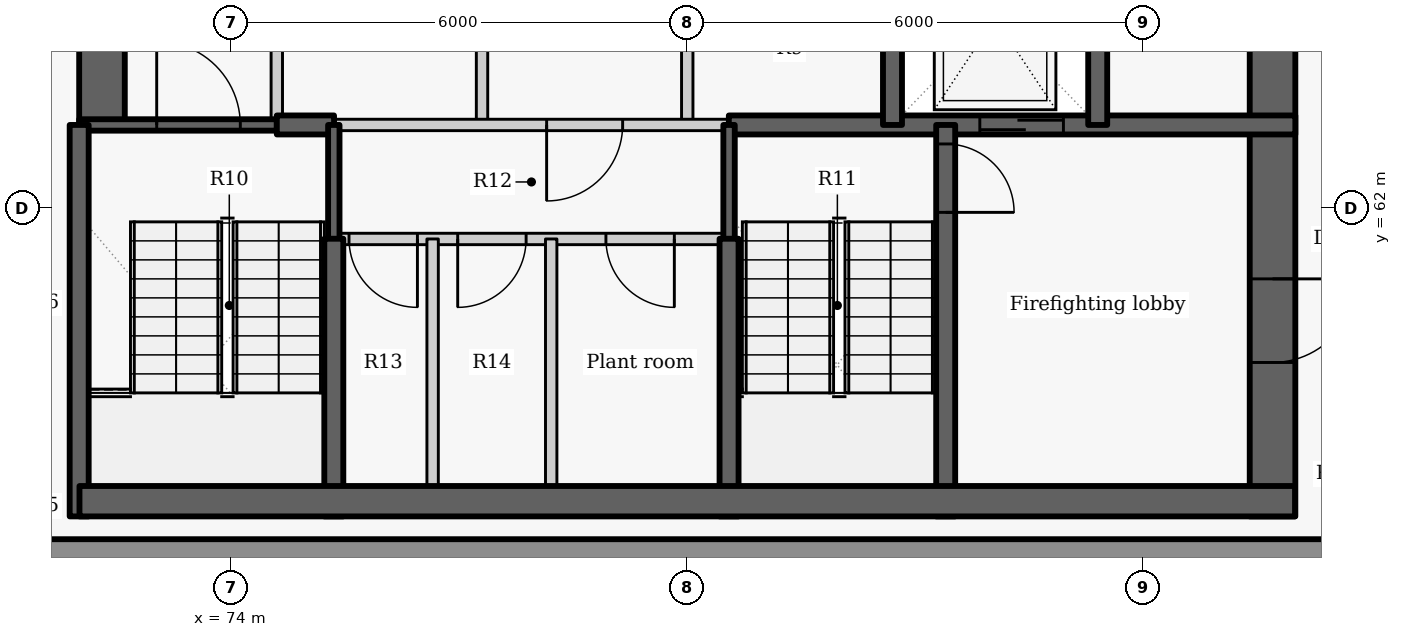
"""IFC4 building model, lengths in metres.
Left out: names, types, materials, properties, quantities, classifications, styles, units other than length and angle.
Written with IfcOpenShell. Run it as: python <this file> out.ifc"""

import sys

from ifc_helpers import new_model, si_unit, direction, frame, frame_2d, origin, place, context, subcontext, project, spatial, rectangle, extrude, element, fill, save


model = new_model("IFC4")
c1 = context("Model", 3, precision=1e-05, world=origin(), true_north=direction((0.0, 1.0)))
c2 = subcontext(c1, "Body", "Model", "MODEL_VIEW")
j1 = project(units=[si_unit("LENGTHUNIT", "METRE"), si_unit("PLANEANGLEUNIT", "RADIAN")], contexts=[c1])
p1 = place(None, origin())
s1 = spatial("IfcSite", under=j1, at=p1, CompositionType="ELEMENT")
p2 = place(p1, origin())
s2 = spatial("IfcBuilding", under=s1, at=p2, CompositionType="ELEMENT")
p3 = place(p2, frame((0.0, 0.0, 276.0)))
s3 = spatial("IfcBuildingStorey", under=s2, at=p3, CompositionType="ELEMENT", Elevation=276.0)
p4 = place(p3, frame((70.451, 57.5, 0.0), z_axis=(0.0, 0.0, 1.0), x_axis=(1.0, 0.0, 0.0)))
e1 = element("IfcWall", 1, at=p4, inside=s3, PredefinedType="SOLIDWALL", context=c2, shape_type="SweptSolid", body=[
    extrude(rectangle(XDim=19.093, YDim=0.3, at=frame_2d((9.546, 0.0))), origin(), (0.0, 0.0, 1.0), 2.725),
])
p5 = place(p3, frame((74.6, 63.1, 0.0), z_axis=(0.0, 0.0, 1.0), x_axis=(0.0, 1.0, 0.0)))
e2 = element("IfcWall", 2, at=p5, inside=s3, PredefinedType="PARTITIONING", context=c2, shape_type="SweptSolid", body=[
    extrude(rectangle(XDim=2.8, YDim=0.15, at=frame_2d((1.4, 0.0))), origin(), (0.0, 0.0, 1.0), 3.325),
])
p6 = place(p3, frame((72.3, 63.1, -0.275), z_axis=(0.0, 0.0, 1.0), x_axis=(0.0, 1.0, 0.0)))
e3 = element("IfcWall", 3, at=p6, inside=s3, PredefinedType="SHEAR", context=c2, shape_type="SweptSolid", body=[
    extrude(rectangle(XDim=9.1, YDim=0.6, at=frame_2d((4.55, 0.0))), origin(), (0.0, 0.0, 1.0), 3.6),
])
p7 = place(p6, frame((3.75, 0.0, 0.275)))
e4 = element("IfcOpeningElement", 4, at=p7, cuts=e3, PredefinedType="OPENING", context=c2, shape_type="SweptSolid", body=[
    extrude(rectangle(XDim=1.5, YDim=2.1, at=frame_2d((0.75, 1.05))), frame((0.0, 0.31, 0.0), z_axis=(0.0, -1.0, 0.0), x_axis=(1.0, 0.0, 0.0)), (0.0, 0.0, 1.0), 0.62),
])
for number, where, z_axis, x_axis in (
    (5, (77.3, 63.1, 0.0), (0.0, 0.0, 1.0), (0.0, 1.0, 0.0)),
    (6, (80.0, 63.1, 0.0), (0.0, 0.0, 1.0), (0.0, 1.0, 0.0)),
):
    element("IfcWall", number, at=place(p3, frame(where, z_axis=z_axis, x_axis=x_axis)), inside=s3, PredefinedType="PARTITIONING", context=c2, shape_type="SweptSolid", body=[
        extrude(rectangle(XDim=2.8, YDim=0.15, at=frame_2d((1.4, 0.0))), origin(), (0.0, 0.0, 1.0), 3.325),
    ])
p8 = place(p3, frame((87.7, 69.3, -0.275), z_axis=(0.0, 0.0, 1.0), x_axis=(0.0, -1.0, 0.0)))
e7 = element("IfcWall", 7, at=p8, inside=s3, PredefinedType="SHEAR", context=c2, shape_type="SweptSolid", body=[
    extrude(rectangle(XDim=11.35, YDim=0.6, at=frame_2d((5.675, 0.0))), origin(), (0.0, 0.0, 1.0), 3.6),
])
p9 = place(p8, frame((0.95, 0.0, 0.275)))
e8 = element("IfcOpeningElement", 8, at=p9, cuts=e7, PredefinedType="OPENING", context=c2, shape_type="SweptSolid", body=[
    extrude(rectangle(XDim=1.5, YDim=2.1, at=frame_2d((0.75, 1.05))), frame((0.0, 0.31, 0.0), z_axis=(0.0, -1.0, 0.0), x_axis=(1.0, 0.0, 0.0)), (0.0, 0.0, 1.0), 0.62),
])
p10 = place(p8, frame((8.225, 0.0, 0.275)))
e9 = element("IfcOpeningElement", 9, at=p10, cuts=e7, PredefinedType="OPENING", context=c2, shape_type="SweptSolid", body=[
    extrude(rectangle(XDim=1.1, YDim=2.1, at=frame_2d((0.55, 1.05))), frame((0.0, 0.31, 0.0), z_axis=(0.0, -1.0, 0.0), x_axis=(1.0, 0.0, 0.0)), (0.0, 0.0, 1.0), 0.62),
])
p11 = place(p3, frame((72.0, 63.1, -0.275), z_axis=(0.0, 0.0, 1.0), x_axis=(1.0, 0.0, 0.0)))
e10 = element("IfcWall", 10, at=p11, inside=s3, PredefinedType="SHEAR", context=c2, shape_type="SweptSolid", body=[
    extrude(rectangle(XDim=2.6, YDim=0.15, at=frame_2d((1.3, 0.0))), origin(), (0.0, 0.0, 1.0), 3.6),
])
p12 = place(p11, frame((1.02, 0.0, 0.275)))
e11 = element("IfcOpeningElement", 11, at=p12, cuts=e10, PredefinedType="OPENING", context=c2, shape_type="SweptSolid", body=[
    extrude(rectangle(XDim=1.1, YDim=2.1, at=frame_2d((0.55, 1.05))), frame((0.0, 0.085, 0.0), z_axis=(0.0, -1.0, 0.0), x_axis=(1.0, 0.0, 0.0)), (0.0, 0.0, 1.0), 0.17),
])
p13 = place(p3, frame((74.6, 63.1, -0.275), z_axis=(0.0, 0.0, 1.0), x_axis=(1.0, 0.0, 0.0)))
e12 = element("IfcWall", 12, at=p13, inside=s3, PredefinedType="SHEAR", context=c2, shape_type="SweptSolid", body=[
    extrude(rectangle(XDim=0.753, YDim=0.25, at=frame_2d((0.376, 0.0))), origin(), (0.0, 0.0, 1.0), 3.6),
])
p14 = place(p3, frame((80.547, 63.1, -0.275), z_axis=(0.0, 0.0, 1.0), x_axis=(1.0, 0.0, 0.0)))
e13 = element("IfcWall", 13, at=p14, inside=s3, PredefinedType="SHEAR", context=c2, shape_type="SweptSolid", body=[
    extrude(rectangle(XDim=7.453, YDim=0.25, at=frame_2d((3.727, 0.0))), origin(), (0.0, 0.0, 1.0), 3.6),
])
p15 = place(p14, frame((3.302, 0.0, 0.275)))
e14 = element("IfcOpeningElement", 14, at=p15, cuts=e13, PredefinedType="OPENING", context=c2, shape_type="SweptSolid", body=[
    extrude(rectangle(XDim=1.1, YDim=2.1, at=frame_2d((0.55, 1.05))), frame((0.0, 0.135, 0.0), z_axis=(0.0, -1.0, 0.0), x_axis=(1.0, 0.0, 0.0)), (0.0, 0.0, 1.0), 0.27),
])
p16 = place(p3, frame((80.553, 63.1, 0.0), z_axis=(0.0, 0.0, 1.0), x_axis=(-1.0, 0.0, 0.0)))
e15 = element("IfcWall", 15, at=p16, inside=s3, PredefinedType="PARTITIONING", context=c2, shape_type="SweptSolid", body=[
    extrude(rectangle(XDim=5.206, YDim=0.15, at=frame_2d((2.603, 0.0))), origin(), (0.0, 0.0, 1.0), 3.325),
])
p17 = place(p16, frame((1.403, 0.0, 0.0)))
e16 = element("IfcOpeningElement", 16, at=p17, cuts=e15, PredefinedType="OPENING", context=c2, shape_type="SweptSolid", body=[
    extrude(rectangle(XDim=1.0, YDim=2.1, at=frame_2d((0.5, 1.05))), frame((0.0, 0.085, 0.0), z_axis=(0.0, -1.0, 0.0), x_axis=(1.0, 0.0, 0.0)), (0.0, 0.0, 1.0), 0.17),
])
for number, where, z_axis, x_axis in (
    (17, (82.7, 63.1, -0.275), (0.0, 0.0, 1.0), (0.0, 1.0, 0.0)),
    (18, (85.4, 63.1, -0.275), (0.0, 0.0, 1.0), (0.0, 1.0, 0.0)),
):
    element("IfcWall", number, at=place(p3, frame(where, z_axis=z_axis, x_axis=x_axis)), inside=s3, PredefinedType="SHEAR", context=c2, shape_type="SweptSolid", body=[
        extrude(rectangle(XDim=2.8, YDim=0.25, at=frame_2d((1.4, 0.0))), origin(), (0.0, 0.0, 1.0), 3.6),
    ])
p18 = place(p3, frame((75.35, 61.597, -0.275), z_axis=(0.0, 0.0, 1.0), x_axis=(0.0, 1.0, 0.0)))
e19 = element("IfcWall", 19, at=p18, inside=s3, PredefinedType="SHEAR", context=c2, shape_type="SweptSolid", body=[
    extrude(rectangle(XDim=1.503, YDim=0.15, at=frame_2d((0.751, 0.0))), origin(), (0.0, 0.0, 1.0), 3.6),
])
p19 = place(p3, frame((75.35, 57.95, -0.275), z_axis=(0.0, 0.0, 1.0), x_axis=(0.0, 1.0, 0.0)))
e20 = element("IfcWall", 20, at=p19, inside=s3, PredefinedType="SHEAR", context=c2, shape_type="SweptSolid", body=[
    extrude(rectangle(XDim=3.653, YDim=0.25, at=frame_2d((1.827, 0.0))), origin(), (0.0, 0.0, 1.0), 3.6),
])
p20 = place(p3, frame((72.0, 57.95, -0.275), z_axis=(0.0, 0.0, 1.0), x_axis=(0.0, 1.0, 0.0)))
e21 = element("IfcWall", 21, at=p20, inside=s3, PredefinedType="SHEAR", context=c2, shape_type="SweptSolid", body=[
    extrude(rectangle(XDim=5.15, YDim=0.25, at=frame_2d((2.575, 0.0))), origin(), (0.0, 0.0, 1.0), 3.6),
])
p21 = place(p3, frame((83.4, 63.1, -0.275), z_axis=(0.0, 0.0, 1.0), x_axis=(0.0, -1.0, 0.0)))
e22 = element("IfcWall", 22, at=p21, inside=s3, PredefinedType="SHEAR", context=c2, shape_type="SweptSolid", body=[
    extrude(rectangle(XDim=5.15, YDim=0.25, at=frame_2d((2.575, 0.0))), origin(), (0.0, 0.0, 1.0), 3.6),
])
p22 = place(p21, frame((0.25, 0.0, 0.275)))
e23 = element("IfcOpeningElement", 23, at=p22, cuts=e22, PredefinedType="OPENING", context=c2, shape_type="SweptSolid", body=[
    extrude(rectangle(XDim=0.9, YDim=2.1, at=frame_2d((0.45, 1.05))), frame((0.0, 0.135, 0.0), z_axis=(0.0, -1.0, 0.0), x_axis=(1.0, 0.0, 0.0)), (0.0, 0.0, 1.0), 0.27),
])
p23 = place(p3, frame((80.55, 61.597, -0.275), z_axis=(0.0, 0.0, 1.0), x_axis=(0.0, 1.0, 0.0)))
e24 = element("IfcWall", 24, at=p23, inside=s3, PredefinedType="SHEAR", context=c2, shape_type="SweptSolid", body=[
    extrude(rectangle(XDim=1.503, YDim=0.15, at=frame_2d((0.751, 0.0))), origin(), (0.0, 0.0, 1.0), 3.6),
])
p24 = place(p3, frame((80.55, 57.95, -0.275), z_axis=(0.0, 0.0, 1.0), x_axis=(0.0, 1.0, 0.0)))
e25 = element("IfcWall", 25, at=p24, inside=s3, PredefinedType="SHEAR", context=c2, shape_type="SweptSolid", body=[
    extrude(rectangle(XDim=3.653, YDim=0.25, at=frame_2d((1.827, 0.0))), origin(), (0.0, 0.0, 1.0), 3.6),
])
p25 = place(p3, frame((80.55, 61.6, 0.0), z_axis=(0.0, 0.0, 1.0), x_axis=(-1.0, 0.0, 0.0)))
e26 = element("IfcWall", 26, at=p25, inside=s3, PredefinedType="PARTITIONING", context=c2, shape_type="SweptSolid", body=[
    extrude(rectangle(XDim=5.2, YDim=0.15, at=frame_2d((2.6, 0.0))), origin(), (0.0, 0.0, 1.0), 3.325),
])
p26 = place(p25, frame((4.1, 0.0, 0.0)))
e27 = element("IfcOpeningElement", 27, at=p26, cuts=e26, PredefinedType="OPENING", context=c2, shape_type="SweptSolid", body=[
    extrude(rectangle(XDim=0.9, YDim=2.1, at=frame_2d((0.45, 1.05))), frame((0.0, 0.085, 0.0), z_axis=(0.0, -1.0, 0.0), x_axis=(1.0, 0.0, 0.0)), (0.0, 0.0, 1.0), 0.17),
])
p27 = place(p25, frame((2.67, 0.0, 0.0)))
e28 = element("IfcOpeningElement", 28, at=p27, cuts=e26, PredefinedType="OPENING", context=c2, shape_type="SweptSolid", body=[
    extrude(rectangle(XDim=0.9, YDim=2.1, at=frame_2d((0.45, 1.05))), frame((0.0, 0.085, 0.0), z_axis=(0.0, -1.0, 0.0), x_axis=(1.0, 0.0, 0.0)), (0.0, 0.0, 1.0), 0.17),
])
p28 = place(p25, frame((0.72, 0.0, 0.0)))
e29 = element("IfcOpeningElement", 29, at=p28, cuts=e26, PredefinedType="OPENING", context=c2, shape_type="SweptSolid", body=[
    extrude(rectangle(XDim=0.9, YDim=2.1, at=frame_2d((0.45, 1.05))), frame((0.0, 0.085, 0.0), z_axis=(0.0, -1.0, 0.0), x_axis=(1.0, 0.0, 0.0)), (0.0, 0.0, 1.0), 0.17),
])
for number, where, z_axis, x_axis in (
    (30, (76.65, 57.95, 0.0), (0.0, 0.0, 1.0), (0.0, 1.0, 0.0)),
    (31, (78.21, 57.95, 0.0), (0.0, 0.0, 1.0), (0.0, 1.0, 0.0)),
):
    element("IfcWall", number, at=place(p3, frame(where, z_axis=z_axis, x_axis=x_axis)), inside=s3, PredefinedType="PARTITIONING", context=c2, shape_type="SweptSolid", body=[
        extrude(rectangle(XDim=3.65, YDim=0.15, at=frame_2d((1.825, 0.0))), origin(), (0.0, 0.0, 1.0), 3.325),
    ])
p29 = place(p3, frame((72.004, 58.15, -0.275), z_axis=(0.0, 0.0, 1.0), x_axis=(1.0, 0.0, 0.0)))
e32 = element("IfcWall", 32, at=p29, inside=s3, PredefinedType="SHEAR", context=c2, shape_type="SweptSolid", body=[
    extrude(rectangle(XDim=15.992, YDim=0.4, at=frame_2d((7.996, 0.0))), origin(), (0.0, 0.0, 1.0), 3.6),
])
p30 = place(p15, origin())
e33 = element("IfcDoor", 33, at=p30, inside=s3, OperationType="SLIDING_TO_LEFT", PredefinedType="DOOR", context=c2, shape_type="SweptSolid", body=[
    extrude(rectangle(XDim=1.1, YDim=2.1, at=frame_2d((0.55, 1.05))), frame((0.0, 0.025, 0.0), z_axis=(0.0, -1.0, 0.0), x_axis=(1.0, 0.0, 0.0)), (0.0, 0.0, 1.0), 0.05),
])
fill(e14, e33)
p31 = place(p17, origin())
e34 = element("IfcDoor", 34, at=p31, inside=s3, OperationType="SINGLE_SWING_RIGHT", PredefinedType="DOOR", context=c2, shape_type="SweptSolid", body=[
    extrude(rectangle(XDim=1.0, YDim=2.1, at=frame_2d((0.5, 1.05))), frame((0.0, 0.025, 0.0), z_axis=(0.0, -1.0, 0.0), x_axis=(1.0, 0.0, 0.0)), (0.0, 0.0, 1.0), 0.05),
])
fill(e16, e34)
p32 = place(p26, origin())
e35 = element("IfcDoor", 35, at=p32, inside=s3, OperationType="SINGLE_SWING_LEFT", PredefinedType="DOOR", context=c2, shape_type="SweptSolid", body=[
    extrude(rectangle(XDim=0.9, YDim=2.1, at=frame_2d((0.45, 1.05))), frame((0.0, 0.025, 0.0), z_axis=(0.0, -1.0, 0.0), x_axis=(1.0, 0.0, 0.0)), (0.0, 0.0, 1.0), 0.05),
])
fill(e27, e35)
p33 = place(p27, origin())
e36 = element("IfcDoor", 36, at=p33, inside=s3, OperationType="SINGLE_SWING_RIGHT", PredefinedType="DOOR", context=c2, shape_type="SweptSolid", body=[
    extrude(rectangle(XDim=0.9, YDim=2.1, at=frame_2d((0.45, 1.05))), frame((0.0, 0.025, 0.0), z_axis=(0.0, -1.0, 0.0), x_axis=(1.0, 0.0, 0.0)), (0.0, 0.0, 1.0), 0.05),
])
fill(e28, e36)
p34 = place(p28, origin())
e37 = element("IfcDoor", 37, at=p34, inside=s3, OperationType="SINGLE_SWING_LEFT", PredefinedType="DOOR", context=c2, shape_type="SweptSolid", body=[
    extrude(rectangle(XDim=0.9, YDim=2.1, at=frame_2d((0.45, 1.05))), frame((0.0, 0.025, 0.0), z_axis=(0.0, -1.0, 0.0), x_axis=(1.0, 0.0, 0.0)), (0.0, 0.0, 1.0), 0.05),
])
fill(e29, e37)
p35 = place(p12, origin())
e38 = element("IfcDoor", 38, at=p35, inside=s3, OperationType="SINGLE_SWING_LEFT", PredefinedType="DOOR", context=c2, shape_type="SweptSolid", body=[
    extrude(rectangle(XDim=1.1, YDim=2.1, at=frame_2d((0.55, 1.05))), frame((0.0, 0.025, 0.0), z_axis=(0.0, -1.0, 0.0), x_axis=(1.0, 0.0, 0.0)), (0.0, 0.0, 1.0), 0.05),
])
fill(e11, e38)
p36 = place(p22, origin())
e39 = element("IfcDoor", 39, at=p36, inside=s3, OperationType="SINGLE_SWING_RIGHT", PredefinedType="DOOR", context=c2, shape_type="SweptSolid", body=[
    extrude(rectangle(XDim=0.9, YDim=2.1, at=frame_2d((0.45, 1.05))), frame((0.0, 0.025, 0.0), z_axis=(0.0, -1.0, 0.0), x_axis=(1.0, 0.0, 0.0)), (0.0, 0.0, 1.0), 0.05),
])
fill(e23, e39)
p37 = place(p10, origin())
e40 = element("IfcDoor", 40, at=p37, inside=s3, OperationType="SINGLE_SWING_LEFT", PredefinedType="DOOR", context=c2, shape_type="SweptSolid", body=[
    extrude(rectangle(XDim=1.1, YDim=2.1, at=frame_2d((0.55, 1.05))), frame((0.0, 0.025, 0.0), z_axis=(0.0, -1.0, 0.0), x_axis=(1.0, 0.0, 0.0)), (0.0, 0.0, 1.0), 0.05),
])
fill(e9, e40)
save(model, sys.argv[1])
